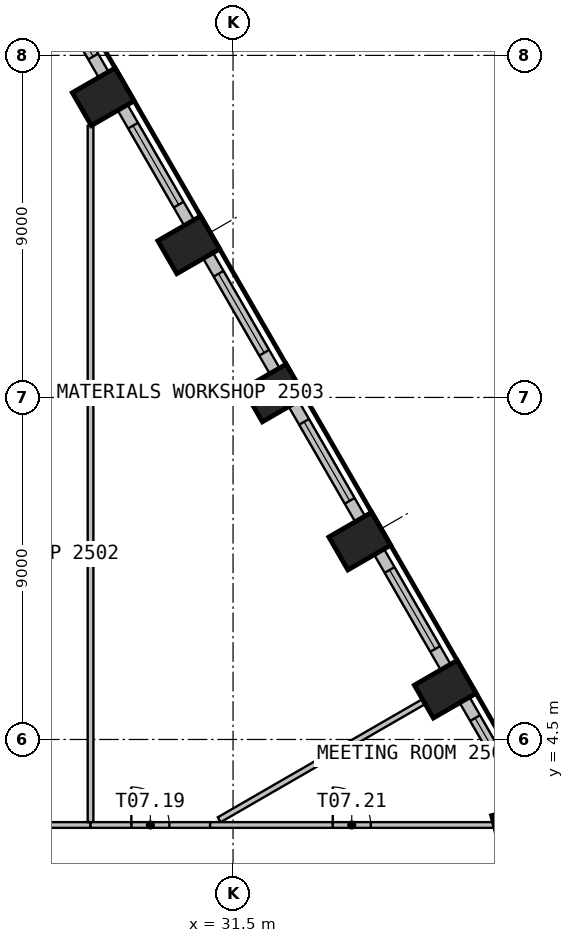
"""IFC4 building model, lengths in metres.
Left out: names, types, materials, properties, quantities, classifications, styles, units other than length and angle.
Written with IfcOpenShell. Run it as: python <this file> out.ifc"""

import sys

from ifc_helpers import new_model, si_unit, direction, frame, frame_2d, origin, origin_2d, place, context, subcontext, project, spatial, rectangle, extrude, element, fill, save


model = new_model("IFC4")
c1 = context("Model", 3, precision=1e-05, world=origin(), true_north=direction((0.0, 1.0)))
c2 = subcontext(c1, "Body", "Model", "MODEL_VIEW")
j1 = project(units=[si_unit("LENGTHUNIT", "METRE"), si_unit("PLANEANGLEUNIT", "RADIAN")], contexts=[c1])
p1 = place(None, origin())
s1 = spatial("IfcSite", under=j1, at=p1, CompositionType="ELEMENT")
p2 = place(p1, origin())
s2 = spatial("IfcBuilding", under=s1, at=p2, CompositionType="ELEMENT")
p3 = place(p2, frame((0.0, 0.0, 104.7)))
s3 = spatial("IfcBuildingStorey", under=s2, at=p3, CompositionType="ELEMENT", Elevation=104.7)
p4 = place(p3, frame((39.101, 2.037, 0.0), z_axis=(0.0, 0.0, 1.0), x_axis=(-0.258819045103, 0.965925826289, 0.0)))
e1 = element("IfcColumn", 1, at=p4, inside=s3, PredefinedType="COLUMN", context=c2, shape_type="SweptSolid", body=[
    extrude(rectangle(XDim=1.3, YDim=1.3, at=origin_2d()), origin(), (0.0, 0.0, 1.0), 3.525),
])
for number, where, z_axis, x_axis in (
    (2, (37.084, 5.822, 0.0), (0.0, 0.0, 1.0), (-0.5, 0.866, 0.0)),
    (3, (34.834, 9.719, 0.0), (0.0, 0.0, 1.0), (-0.5, 0.866, 0.0)),
    (4, (32.584, 13.616, 0.0), (0.0, 0.0, 1.0), (-0.5, 0.866, 0.0)),
    (5, (30.334, 17.513, 0.0), (0.0, 0.0, 1.0), (-0.5, 0.866, 0.0)),
    (6, (28.084, 21.411, 0.0), (0.0, 0.0, 1.0), (-0.5, 0.866, 0.0)),
):
    element("IfcColumn", number, at=place(p3, frame(where, z_axis=z_axis, x_axis=x_axis)), inside=s3, PredefinedType="COLUMN", context=c2, shape_type="SweptSolid", body=[
        extrude(rectangle(XDim=1.0, YDim=1.3, at=origin_2d()), origin(), (0.0, 0.0, 1.0), 3.525),
    ])
p5 = place(p3, frame((39.19, 2.774, 0.0), z_axis=(0.0, 0.0, 1.0), x_axis=(-0.500004907028, 0.866022570692, 0.0)))
e7 = element("IfcWall", 7, at=p5, inside=s3, PredefinedType="SOLIDWALL", context=c2, shape_type="SweptSolid", body=[
    extrude(rectangle(XDim=3.192, YDim=0.3, at=frame_2d((1.596, 0.0))), origin(), (0.0, 0.0, 1.0), 3.525),
])
p6 = place(p5, frame((0.243, 0.0, 0.9)))
e8 = element("IfcOpeningElement", 8, at=p6, cuts=e7, PredefinedType="OPENING", context=c2, shape_type="SweptSolid", body=[
    extrude(rectangle(XDim=2.4, YDim=2.1, at=frame_2d((1.2, 1.05))), frame((0.0, 0.16, 0.0), z_axis=(0.0, -1.0, 0.0), x_axis=(1.0, 0.0, 0.0)), (0.0, 0.0, 1.0), 0.32),
])
p7 = place(p3, frame((37.094, 6.406, 0.0), z_axis=(0.0, 0.0, 1.0), x_axis=(-0.499996256241, 0.866027565234, 0.0)))
e9 = element("IfcWall", 9, at=p7, inside=s3, PredefinedType="SOLIDWALL", context=c2, shape_type="SweptSolid", body=[
    extrude(rectangle(XDim=3.499, YDim=0.3, at=frame_2d((1.75, 0.0))), origin(), (0.0, 0.0, 1.0), 3.525),
])
p8 = place(p7, frame((0.55, 0.0, 0.9)))
e10 = element("IfcOpeningElement", 10, at=p8, cuts=e9, PredefinedType="OPENING", context=c2, shape_type="SweptSolid", body=[
    extrude(rectangle(XDim=2.4, YDim=2.1, at=frame_2d((1.2, 1.05))), frame((0.0, 0.16, 0.0), z_axis=(0.0, -1.0, 0.0), x_axis=(1.0, 0.0, 0.0)), (0.0, 0.0, 1.0), 0.32),
])
p9 = place(p3, frame((34.844, 10.303, 0.0), z_axis=(0.0, 0.0, 1.0), x_axis=(-0.499996256241, 0.866027565234, 0.0)))
e11 = element("IfcWall", 11, at=p9, inside=s3, PredefinedType="SOLIDWALL", context=c2, shape_type="SweptSolid", body=[
    extrude(rectangle(XDim=3.499, YDim=0.3, at=frame_2d((1.75, 0.0))), origin(), (0.0, 0.0, 1.0), 3.525),
])
p10 = place(p9, frame((0.55, 0.0, 0.9)))
e12 = element("IfcOpeningElement", 12, at=p10, cuts=e11, PredefinedType="OPENING", context=c2, shape_type="SweptSolid", body=[
    extrude(rectangle(XDim=2.4, YDim=2.1, at=frame_2d((1.2, 1.05))), frame((0.0, 0.16, 0.0), z_axis=(0.0, -1.0, 0.0), x_axis=(1.0, 0.0, 0.0)), (0.0, 0.0, 1.0), 0.32),
])
p11 = place(p3, frame((32.594, 14.2, 0.0), z_axis=(0.0, 0.0, 1.0), x_axis=(-0.499996256241, 0.866027565234, 0.0)))
e13 = element("IfcWall", 13, at=p11, inside=s3, PredefinedType="SOLIDWALL", context=c2, shape_type="SweptSolid", body=[
    extrude(rectangle(XDim=3.499, YDim=0.3, at=frame_2d((1.75, 0.0))), origin(), (0.0, 0.0, 1.0), 3.525),
])
p12 = place(p11, frame((0.55, 0.0, 0.9)))
e14 = element("IfcOpeningElement", 14, at=p12, cuts=e13, PredefinedType="OPENING", context=c2, shape_type="SweptSolid", body=[
    extrude(rectangle(XDim=2.4, YDim=2.1, at=frame_2d((1.2, 1.05))), frame((0.0, 0.16, 0.0), z_axis=(0.0, -1.0, 0.0), x_axis=(1.0, 0.0, 0.0)), (0.0, 0.0, 1.0), 0.32),
])
p13 = place(p3, frame((30.344, 18.097, 0.0), z_axis=(0.0, 0.0, 1.0), x_axis=(-0.499996256241, 0.866027565234, 0.0)))
e15 = element("IfcWall", 15, at=p13, inside=s3, PredefinedType="SOLIDWALL", context=c2, shape_type="SweptSolid", body=[
    extrude(rectangle(XDim=3.499, YDim=0.3, at=frame_2d((1.75, 0.0))), origin(), (0.0, 0.0, 1.0), 3.525),
])
p14 = place(p13, frame((0.55, 0.0, 0.9)))
e16 = element("IfcOpeningElement", 16, at=p14, cuts=e15, PredefinedType="OPENING", context=c2, shape_type="SweptSolid", body=[
    extrude(rectangle(XDim=2.4, YDim=2.1, at=frame_2d((1.2, 1.05))), frame((0.0, 0.16, 0.0), z_axis=(0.0, -1.0, 0.0), x_axis=(1.0, 0.0, 0.0)), (0.0, 0.0, 1.0), 0.32),
])
p15 = place(p3, frame((28.094, 21.994, 0.0), z_axis=(0.0, 0.0, 1.0), x_axis=(-0.499996256241, 0.866027565234, 0.0)))
e17 = element("IfcWall", 17, at=p15, inside=s3, PredefinedType="SOLIDWALL", context=c2, shape_type="SweptSolid", body=[
    extrude(rectangle(XDim=3.499, YDim=0.3, at=frame_2d((1.75, 0.0))), origin(), (0.0, 0.0, 1.0), 3.525),
])
p16 = place(p15, frame((0.55, 0.0, 0.9)))
e18 = element("IfcOpeningElement", 18, at=p16, cuts=e17, PredefinedType="OPENING", context=c2, shape_type="SweptSolid", body=[
    extrude(rectangle(XDim=2.4, YDim=2.1, at=frame_2d((1.2, 1.05))), frame((0.0, 0.16, 0.0), z_axis=(0.0, -1.0, 0.0), x_axis=(1.0, 0.0, 0.0)), (0.0, 0.0, 1.0), 0.32),
])
p17 = place(p3, frame((21.075, 2.25, 0.0), z_axis=(0.0, 0.0, 1.0), x_axis=(1.0, 0.0, 0.0)))
e19 = element("IfcWall", 19, at=p17, inside=s3, PredefinedType="PARTITIONING", context=c2, shape_type="SweptSolid", body=[
    extrude(rectangle(XDim=6.675, YDim=0.15, at=frame_2d((3.337, 0.0))), origin(), (0.0, 0.0, 1.0), 3.525),
])
p18 = place(p3, frame((27.75, 20.649, 0.0), z_axis=(0.0, 0.0, 1.0), x_axis=(0.0, -1.0, 0.0)))
e20 = element("IfcWall", 20, at=p18, inside=s3, PredefinedType="PARTITIONING", context=c2, shape_type="SweptSolid", body=[
    extrude(rectangle(XDim=18.324, YDim=0.15, at=frame_2d((9.162, 0.0))), origin(), (0.0, 0.0, 1.0), 3.525),
])
p19 = place(p3, frame((27.75, 2.25, 0.0), z_axis=(0.0, 0.0, 1.0), x_axis=(1.0, 0.0, 0.0)))
e21 = element("IfcWall", 21, at=p19, inside=s3, PredefinedType="PARTITIONING", context=c2, shape_type="SweptSolid", body=[
    extrude(rectangle(XDim=3.147, YDim=0.15, at=frame_2d((1.573, 0.0))), origin(), (0.0, 0.0, 1.0), 3.525),
])
p20 = place(p19, frame((1.073, 0.0, 0.0)))
e22 = element("IfcOpeningElement", 22, at=p20, cuts=e21, PredefinedType="OPENING", context=c2, shape_type="SweptSolid", body=[
    extrude(rectangle(XDim=1.0, YDim=2.1, at=frame_2d((0.5, 1.05))), frame((0.0, 0.085, 0.0), z_axis=(0.0, -1.0, 0.0), x_axis=(1.0, 0.0, 0.0)), (0.0, 0.0, 1.0), 0.17),
])
p21 = place(p3, frame((36.504, 5.487, 0.0), z_axis=(0.0, 0.0, 1.0), x_axis=(-0.866007197923, -0.500031532152, 0.0)))
e23 = element("IfcWall", 23, at=p21, inside=s3, PredefinedType="PARTITIONING", context=c2, shape_type="SweptSolid", body=[
    extrude(rectangle(XDim=6.199, YDim=0.15, at=frame_2d((3.1, 0.0))), origin(), (0.0, 0.0, 1.0), 3.525),
])
p22 = place(p3, frame((30.897, 2.25, 0.0), z_axis=(0.0, 0.0, 1.0), x_axis=(1.0, 0.0, 0.0)))
e24 = element("IfcWall", 24, at=p22, inside=s3, PredefinedType="PARTITIONING", context=c2, shape_type="SweptSolid", body=[
    extrude(rectangle(XDim=7.453, YDim=0.15, at=frame_2d((3.727, 0.0))), origin(), (0.0, 0.0, 1.0), 3.525),
])
p23 = place(p22, frame((3.227, 0.0, 0.0)))
e25 = element("IfcOpeningElement", 25, at=p23, cuts=e24, PredefinedType="OPENING", context=c2, shape_type="SweptSolid", body=[
    extrude(rectangle(XDim=1.0, YDim=2.1, at=frame_2d((0.5, 1.05))), frame((0.0, 0.085, 0.0), z_axis=(0.0, -1.0, 0.0), x_axis=(1.0, 0.0, 0.0)), (0.0, 0.0, 1.0), 0.17),
])
p24 = place(p6, origin())
e26 = element("IfcWindow", 26, at=p24, inside=s3, PartitioningType="SINGLE_PANEL", PredefinedType="WINDOW", context=c2, shape_type="SweptSolid", body=[
    extrude(rectangle(XDim=2.4, YDim=2.1, at=frame_2d((1.2, 1.05))), frame((0.0, 0.03, 0.0), z_axis=(0.0, -1.0, 0.0), x_axis=(1.0, 0.0, 0.0)), (0.0, 0.0, 1.0), 0.06),
])
fill(e8, e26)
p25 = place(p8, origin())
e27 = element("IfcWindow", 27, at=p25, inside=s3, PartitioningType="SINGLE_PANEL", PredefinedType="WINDOW", context=c2, shape_type="SweptSolid", body=[
    extrude(rectangle(XDim=2.4, YDim=2.1, at=frame_2d((1.2, 1.05))), frame((0.0, 0.03, 0.0), z_axis=(0.0, -1.0, 0.0), x_axis=(1.0, 0.0, 0.0)), (0.0, 0.0, 1.0), 0.06),
])
fill(e10, e27)
p26 = place(p10, origin())
e28 = element("IfcWindow", 28, at=p26, inside=s3, PartitioningType="SINGLE_PANEL", PredefinedType="WINDOW", context=c2, shape_type="SweptSolid", body=[
    extrude(rectangle(XDim=2.4, YDim=2.1, at=frame_2d((1.2, 1.05))), frame((0.0, 0.03, 0.0), z_axis=(0.0, -1.0, 0.0), x_axis=(1.0, 0.0, 0.0)), (0.0, 0.0, 1.0), 0.06),
])
fill(e12, e28)
p27 = place(p12, origin())
e29 = element("IfcWindow", 29, at=p27, inside=s3, PartitioningType="SINGLE_PANEL", PredefinedType="WINDOW", context=c2, shape_type="SweptSolid", body=[
    extrude(rectangle(XDim=2.4, YDim=2.1, at=frame_2d((1.2, 1.05))), frame((0.0, 0.03, 0.0), z_axis=(0.0, -1.0, 0.0), x_axis=(1.0, 0.0, 0.0)), (0.0, 0.0, 1.0), 0.06),
])
fill(e14, e29)
p28 = place(p14, origin())
e30 = element("IfcWindow", 30, at=p28, inside=s3, PartitioningType="SINGLE_PANEL", PredefinedType="WINDOW", context=c2, shape_type="SweptSolid", body=[
    extrude(rectangle(XDim=2.4, YDim=2.1, at=frame_2d((1.2, 1.05))), frame((0.0, 0.03, 0.0), z_axis=(0.0, -1.0, 0.0), x_axis=(1.0, 0.0, 0.0)), (0.0, 0.0, 1.0), 0.06),
])
fill(e16, e30)
p29 = place(p16, origin())
e31 = element("IfcWindow", 31, at=p29, inside=s3, PartitioningType="SINGLE_PANEL", PredefinedType="WINDOW", context=c2, shape_type="SweptSolid", body=[
    extrude(rectangle(XDim=2.4, YDim=2.1, at=frame_2d((1.2, 1.05))), frame((0.0, 0.03, 0.0), z_axis=(0.0, -1.0, 0.0), x_axis=(1.0, 0.0, 0.0)), (0.0, 0.0, 1.0), 0.06),
])
fill(e18, e31)
p30 = place(p20, origin())
e32 = element("IfcDoor", 32, at=p30, inside=s3, OperationType="SINGLE_SWING_LEFT", PredefinedType="DOOR", context=c2, shape_type="SweptSolid", body=[
    extrude(rectangle(XDim=1.0, YDim=2.1, at=frame_2d((0.5, 1.05))), frame((0.0, 0.025, 0.0), z_axis=(0.0, -1.0, 0.0), x_axis=(1.0, 0.0, 0.0)), (0.0, 0.0, 1.0), 0.05),
])
fill(e22, e32)
p31 = place(p23, origin())
e33 = element("IfcDoor", 33, at=p31, inside=s3, OperationType="SINGLE_SWING_RIGHT", PredefinedType="DOOR", context=c2, shape_type="SweptSolid", body=[
    extrude(rectangle(XDim=1.0, YDim=2.1, at=frame_2d((0.5, 1.05))), frame((0.0, 0.025, 0.0), z_axis=(0.0, -1.0, 0.0), x_axis=(1.0, 0.0, 0.0)), (0.0, 0.0, 1.0), 0.05),
])
fill(e25, e33)
save(model, sys.argv[1])
